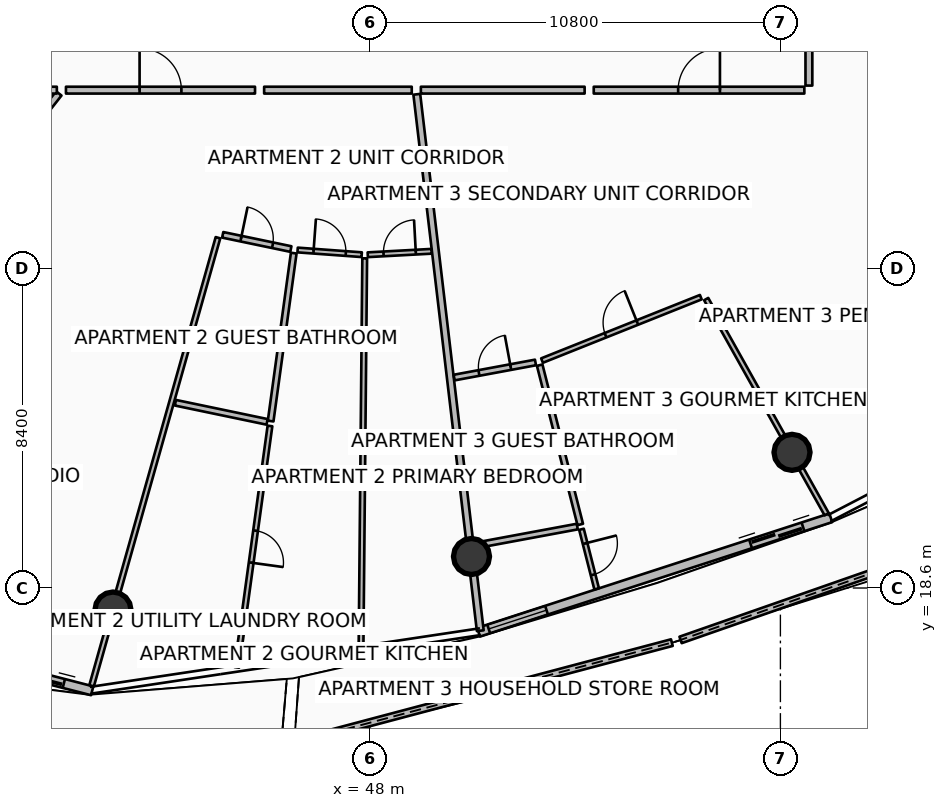
"""IFC4 building model, lengths in metres.
Left out: names, types, materials, properties, quantities, classifications, styles, units other than length and angle.
Written with IfcOpenShell. Run it as: python <this file> out.ifc"""

import sys

from ifc_helpers import new_model, si_unit, direction, frame, frame_2d, origin, origin_2d, place, context, subcontext, project, spatial, polyline, rectangle, circle, outline, extrude, element, fill, save


model = new_model("IFC4")
c1 = context("Model", 3, precision=1e-05, world=origin(), true_north=direction((0.0, 1.0)))
c2 = subcontext(c1, "Body", "Model", "MODEL_VIEW")
j1 = project(units=[si_unit("LENGTHUNIT", "METRE"), si_unit("PLANEANGLEUNIT", "RADIAN")], contexts=[c1])
p1 = place(None, origin())
s1 = spatial("IfcSite", under=j1, at=p1, CompositionType="ELEMENT")
p2 = place(p1, origin())
s2 = spatial("IfcBuilding", under=s1, at=p2, CompositionType="ELEMENT")
p3 = place(p2, frame((0.0, 0.0, 279.05)))
s3 = spatial("IfcBuildingStorey", under=s2, at=p3, CompositionType="ELEMENT", Elevation=279.05)
for number, where, z_axis, x_axis in (
    (1, (41.237, 18.021, 0.0), (0.0, 0.0, 1.0), (1.0, 0.0, 0.0)),
    (2, (50.671, 19.429, 0.0), (0.0, 0.0, 1.0), (1.0, 0.0, 0.0)),
    (3, (59.105, 22.17, 0.0), (0.0, 0.0, 1.0), (1.0, 0.0, 0.0)),
):
    element("IfcColumn", number, at=place(p3, frame(where, z_axis=z_axis, x_axis=x_axis)), inside=s3, PredefinedType="COLUMN", context=c2, shape_type="SweptSolid", body=[
        extrude(circle(Radius=0.475, at=origin_2d()), origin(), (0.0, 0.0, 1.0), 3.59),
    ])
p4 = place(p3, frame((46.007, 14.527, 0.0), z_axis=(0.0, 0.0, 1.0), x_axis=(0.96657188746, 0.256395761219, 0.0)))
e4 = element("IfcWall", 4, at=p4, inside=s3, PredefinedType="PARAPET", context=c2, shape_type="SweptSolid", body=[
    extrude(outline(polyline([(0.0, 0.0), (10.281, 0.0), (10.281, 1.148), (5.14, 1.127), (0.0, 1.224), (0.0, 0.0)])), frame((0.0, 0.09, 0.0), z_axis=(0.0, -1.0, 0.0), x_axis=(1.0, 0.0, 0.0)), (0.0, 0.0, 1.0), 0.18),
])
p5 = place(p3, frame((56.173, 17.234, 0.0), z_axis=(0.0, 0.0, 1.0), x_axis=(0.944003849273, 0.329934436757, 0.0)))
e5 = element("IfcWall", 5, at=p5, inside=s3, PredefinedType="PARAPET", context=c2, shape_type="SweptSolid", body=[
    extrude(outline(polyline([(0.0, 0.0), (10.406, 0.0), (10.406, 1.483), (5.203, 1.284), (0.0, 1.148), (0.0, 0.0)])), frame((0.0, 0.09, 0.0), z_axis=(0.0, -1.0, 0.0), x_axis=(1.0, 0.0, 0.0)), (0.0, 0.0, 1.0), 0.18),
])
p6 = place(p3, frame((29.614, 18.751, 0.0), z_axis=(0.0, 0.0, 1.0), x_axis=(0.968343758421, -0.249620442927, 0.0)))
e6 = element("IfcWall", 6, at=p6, inside=s3, PredefinedType="SOLIDWALL", context=c2, shape_type="SweptSolid", body=[
    extrude(rectangle(XDim=11.438, YDim=0.24, at=frame_2d((5.719, 0.0))), origin(), (0.0, 0.0, 1.0), 2.54),
])
p7 = place(p6, frame((9.218, 0.0, 0.0)))
e7 = element("IfcOpeningElement", 7, at=p7, cuts=e6, PredefinedType="OPENING", context=c2, shape_type="SweptSolid", body=[
    extrude(rectangle(XDim=1.45, YDim=2.15, at=frame_2d((0.725, 1.075))), frame((0.0, 0.13, 0.0), z_axis=(0.0, -1.0, 0.0), x_axis=(1.0, 0.0, 0.0)), (0.0, 0.0, 1.0), 0.26),
])
p8 = place(p6, frame((0.28, 0.0, 0.65)))
e8 = element("IfcOpeningElement", 8, at=p8, cuts=e6, PredefinedType="OPENING", context=c2, shape_type="SweptSolid", body=[
    extrude(rectangle(XDim=1.6, YDim=1.5, at=frame_2d((0.8, 0.75))), frame((0.0, 0.13, 0.0), z_axis=(0.0, -1.0, 0.0), x_axis=(1.0, 0.0, 0.0)), (0.0, 0.0, 1.0), 0.26),
])
p9 = place(p3, frame((50.858, 17.436, 0.0), z_axis=(0.0, 0.0, 1.0), x_axis=(0.951055974609, 0.309018661507, 0.0)))
e9 = element("IfcWall", 9, at=p9, inside=s3, PredefinedType="SOLIDWALL", context=c2, shape_type="SweptSolid", body=[
    extrude(rectangle(XDim=9.745, YDim=0.24, at=frame_2d((4.873, 0.0))), origin(), (0.0, 0.0, 1.0), 2.54),
])
p10 = place(p9, frame((7.525, 0.0, 0.0)))
e10 = element("IfcOpeningElement", 10, at=p10, cuts=e9, PredefinedType="OPENING", context=c2, shape_type="SweptSolid", body=[
    extrude(rectangle(XDim=1.45, YDim=2.15, at=frame_2d((0.725, 1.075))), frame((0.0, 0.13, 0.0), z_axis=(0.0, -1.0, 0.0), x_axis=(1.0, 0.0, 0.0)), (0.0, 0.0, 1.0), 0.26),
])
p11 = place(p9, frame((0.28, 0.0, 0.65)))
e11 = element("IfcOpeningElement", 11, at=p11, cuts=e9, PredefinedType="OPENING", context=c2, shape_type="SweptSolid", body=[
    extrude(rectangle(XDim=1.6, YDim=1.5, at=frame_2d((0.8, 0.75))), frame((0.0, 0.13, 0.0), z_axis=(0.0, -1.0, 0.0), x_axis=(1.0, 0.0, 0.0)), (0.0, 0.0, 1.0), 0.26),
])
p12 = place(p3, frame((39.812, 31.614, 0.0), z_axis=(0.0, 0.0, 1.0), x_axis=(-0.619097230176, -0.785314344443, 0.0)))
e12 = element("IfcWall", 12, at=p12, inside=s3, PredefinedType="PARTITIONING", context=c2, shape_type="SweptSolid", body=[
    extrude(rectangle(XDim=16.37, YDim=0.18, at=frame_2d((8.185, 0.0))), origin(), (0.0, 0.0, 1.0), 2.957),
])
p13 = place(p3, frame((49.232, 31.591, 0.0), z_axis=(0.0, 0.0, 1.0), x_axis=(0.117545848714, -0.993067456646, 0.0)))
e13 = element("IfcWall", 13, at=p13, inside=s3, PredefinedType="PARTITIONING", context=c2, shape_type="SweptSolid", body=[
    extrude(rectangle(XDim=14.213, YDim=0.18, at=frame_2d((7.106, 0.0))), origin(), (0.0, 0.0, 1.0), 2.957),
])
p14 = place(p3, frame((37.42, 31.7, 0.0), z_axis=(0.0, 0.0, 1.0), x_axis=(1.0, 0.0, 0.0)))
e14 = element("IfcWall", 14, at=p14, inside=s3, PredefinedType="PARTITIONING", context=c2, shape_type="SweptSolid", body=[
    extrude(rectangle(XDim=2.34, YDim=0.18, at=frame_2d((1.17, 0.0))), origin(), (0.0, 0.0, 1.0), 2.957),
])
p15 = place(p3, frame((40.0, 31.7, 0.0), z_axis=(0.0, 0.0, 1.0), x_axis=(1.0, 0.0, 0.0)))
e15 = element("IfcWall", 15, at=p15, inside=s3, PredefinedType="PARTITIONING", context=c2, shape_type="SweptSolid", body=[
    extrude(rectangle(XDim=4.975, YDim=0.18, at=frame_2d((2.488, 0.0))), origin(), (0.0, 0.0, 1.0), 2.957),
])
p16 = place(p15, frame((1.938, 0.0, 0.0)))
e16 = element("IfcOpeningElement", 16, at=p16, cuts=e15, PredefinedType="OPENING", context=c2, shape_type="SweptSolid", body=[
    extrude(rectangle(XDim=1.1, YDim=2.1, at=frame_2d((0.55, 1.05))), frame((0.0, 0.1, 0.0), z_axis=(0.0, -1.0, 0.0), x_axis=(1.0, 0.0, 0.0)), (0.0, 0.0, 1.0), 0.2),
])
p17 = place(p3, frame((45.215, 31.7, 0.0), z_axis=(0.0, 0.0, 1.0), x_axis=(1.0, 0.0, 0.0)))
e17 = element("IfcWall", 17, at=p17, inside=s3, PredefinedType="PARTITIONING", context=c2, shape_type="SweptSolid", body=[
    extrude(rectangle(XDim=3.884, YDim=0.18, at=frame_2d((1.942, 0.0))), origin(), (0.0, 0.0, 1.0), 2.957),
])
p18 = place(p3, frame((44.0, 27.817, 0.0), z_axis=(0.0, 0.0, 1.0), x_axis=(-0.271434127064, -0.962457019646, 0.0)))
e18 = element("IfcWall", 18, at=p18, inside=s3, PredefinedType="PARTITIONING", context=c2, shape_type="SweptSolid", body=[
    extrude(rectangle(XDim=12.249, YDim=0.125, at=frame_2d((6.125, 0.0))), origin(), (0.0, 0.0, 1.0), 2.957),
])
p19 = place(p3, frame((44.125, 27.893, 0.0), z_axis=(0.0, 0.0, 1.0), x_axis=(0.978900502262, -0.204337482294, 0.0)))
e19 = element("IfcWall", 19, at=p19, inside=s3, PredefinedType="PARTITIONING", context=c2, shape_type="SweptSolid", body=[
    extrude(rectangle(XDim=1.832, YDim=0.15, at=frame_2d((0.916, 0.0))), origin(), (0.0, 0.0, 1.0), 2.957),
])
p20 = place(p19, frame((0.491, 0.0, 0.0)))
e20 = element("IfcOpeningElement", 20, at=p20, cuts=e19, PredefinedType="OPENING", context=c2, shape_type="SweptSolid", body=[
    extrude(rectangle(XDim=0.85, YDim=2.06, at=frame_2d((0.425, 1.03))), frame((0.0, 0.085, 0.0), z_axis=(0.0, -1.0, 0.0), x_axis=(1.0, 0.0, 0.0)), (0.0, 0.0, 1.0), 0.17),
])
p21 = place(p3, frame((42.879, 23.475, 0.0), z_axis=(0.0, 0.0, 1.0), x_axis=(0.978912814884, -0.204278488479, 0.0)))
e21 = element("IfcWall", 21, at=p21, inside=s3, PredefinedType="PARTITIONING", context=c2, shape_type="SweptSolid", body=[
    extrude(rectangle(XDim=2.466, YDim=0.15, at=frame_2d((1.233, 0.0))), origin(), (0.0, 0.0, 1.0), 2.957),
])
p22 = place(p3, frame((45.994, 27.411, 0.0), z_axis=(0.0, 0.0, 1.0), x_axis=(-0.136246545396, -0.99067496126, 0.0)))
e22 = element("IfcWall", 22, at=p22, inside=s3, PredefinedType="PARTITIONING", context=c2, shape_type="SweptSolid", body=[
    extrude(rectangle(XDim=4.46, YDim=0.15, at=frame_2d((2.23, 0.0))), origin(), (0.0, 0.0, 1.0), 3.03),
])
p23 = place(p3, frame((45.368, 22.864, 0.0), z_axis=(0.0, 0.0, 1.0), x_axis=(-0.136200589596, -0.99068128043, 0.0)))
e23 = element("IfcWall", 23, at=p23, inside=s3, PredefinedType="PARTITIONING", context=c2, shape_type="SweptSolid", body=[
    extrude(rectangle(XDim=6.412, YDim=0.125, at=frame_2d((3.206, 0.0))), origin(), (0.0, 0.0, 1.0), 3.03),
])
p24 = place(p23, frame((2.781, 0.0, 0.0)))
e24 = element("IfcOpeningElement", 24, at=p24, cuts=e23, PredefinedType="OPENING", context=c2, shape_type="SweptSolid", body=[
    extrude(rectangle(XDim=0.85, YDim=2.06, at=frame_2d((0.425, 1.03))), frame((0.0, 0.073, 0.0), z_axis=(0.0, -1.0, 0.0), x_axis=(1.0, 0.0, 0.0)), (0.0, 0.0, 1.0), 0.145),
])
p25 = place(p3, frame((47.861, 27.275, 0.0), z_axis=(0.0, 0.0, 1.0), x_axis=(-0.009436905939, -0.999955471412, 0.0)))
e25 = element("IfcWall", 25, at=p25, inside=s3, PredefinedType="PARTITIONING", context=c2, shape_type="SweptSolid", body=[
    extrude(rectangle(XDim=10.271, YDim=0.125, at=frame_2d((5.135, 0.0))), origin(), (0.0, 0.0, 1.0), 3.03),
])
p26 = place(p3, frame((46.096, 27.494, 0.0), z_axis=(0.0, 0.0, 1.0), x_axis=(0.997337823183, -0.072919588925, 0.0)))
e26 = element("IfcWall", 26, at=p26, inside=s3, PredefinedType="PARTITIONING", context=c2, shape_type="SweptSolid", body=[
    extrude(rectangle(XDim=1.691, YDim=0.125, at=frame_2d((0.845, 0.0))), origin(), (0.0, 0.0, 1.0), 3.03),
])
p27 = place(p26, frame((0.42, 0.0, 0.0)))
e27 = element("IfcOpeningElement", 27, at=p27, cuts=e26, PredefinedType="OPENING", context=c2, shape_type="SweptSolid", body=[
    extrude(rectangle(XDim=0.85, YDim=2.06, at=frame_2d((0.425, 1.03))), frame((0.0, 0.073, 0.0), z_axis=(0.0, -1.0, 0.0), x_axis=(1.0, 0.0, 0.0)), (0.0, 0.0, 1.0), 0.145),
])
p28 = place(p3, frame((47.942, 27.369, 0.0), z_axis=(0.0, 0.0, 1.0), x_axis=(0.998523596101, 0.054319683628, 0.0)))
e28 = element("IfcWall", 28, at=p28, inside=s3, PredefinedType="PARTITIONING", context=c2, shape_type="SweptSolid", body=[
    extrude(rectangle(XDim=1.681, YDim=0.125, at=frame_2d((0.84, 0.0))), origin(), (0.0, 0.0, 1.0), 3.03),
])
p29 = place(p28, frame((0.415, 0.0, 0.0)))
e29 = element("IfcOpeningElement", 29, at=p29, cuts=e28, PredefinedType="OPENING", context=c2, shape_type="SweptSolid", body=[
    extrude(rectangle(XDim=0.85, YDim=2.06, at=frame_2d((0.425, 1.03))), frame((0.0, 0.073, 0.0), z_axis=(0.0, -1.0, 0.0), x_axis=(1.0, 0.0, 0.0)), (0.0, 0.0, 1.0), 0.145),
])
p30 = place(p3, frame((53.888, 31.7, 0.0), z_axis=(0.0, 0.0, 1.0), x_axis=(1.0, 0.0, 0.0)))
e30 = element("IfcWall", 30, at=p30, inside=s3, PredefinedType="PARTITIONING", context=c2, shape_type="SweptSolid", body=[
    extrude(rectangle(XDim=5.542, YDim=0.18, at=frame_2d((2.771, 0.0))), origin(), (0.0, 0.0, 1.0), 2.957),
])
p31 = place(p30, frame((2.221, 0.0, 0.0)))
e31 = element("IfcOpeningElement", 31, at=p31, cuts=e30, PredefinedType="OPENING", context=c2, shape_type="SweptSolid", body=[
    extrude(rectangle(XDim=1.1, YDim=2.1, at=frame_2d((0.55, 1.05))), frame((0.0, 0.1, 0.0), z_axis=(0.0, -1.0, 0.0), x_axis=(1.0, 0.0, 0.0)), (0.0, 0.0, 1.0), 0.2),
])
p32 = place(p3, frame((59.55, 31.82, 0.0), z_axis=(0.0, 0.0, 1.0), x_axis=(0.0, 1.0, 0.0)))
e32 = element("IfcWall", 32, at=p32, inside=s3, PredefinedType="PARTITIONING", context=c2, shape_type="SweptSolid", body=[
    extrude(rectangle(XDim=0.955, YDim=0.18, at=frame_2d((0.477, 0.0))), origin(), (0.0, 0.0, 1.0), 2.957),
])
p33 = place(p3, frame((49.339, 31.7, 0.0), z_axis=(0.0, 0.0, 1.0), x_axis=(1.0, 0.0, 0.0)))
e33 = element("IfcWall", 33, at=p33, inside=s3, PredefinedType="PARTITIONING", context=c2, shape_type="SweptSolid", body=[
    extrude(rectangle(XDim=4.309, YDim=0.18, at=frame_2d((2.155, 0.0))), origin(), (0.0, 0.0, 1.0), 2.957),
])
p34 = place(p3, frame((56.847, 26.203, 0.0), z_axis=(0.0, 0.0, 1.0), x_axis=(0.488636594114, -0.872487409017, 0.0)))
e34 = element("IfcWall", 34, at=p34, inside=s3, PredefinedType="PARTITIONING", context=c2, shape_type="SweptSolid", body=[
    extrude(rectangle(XDim=6.489, YDim=0.125, at=frame_2d((3.244, 0.0))), origin(), (0.0, 0.0, 1.0), 2.957),
])
p35 = place(p3, frame((50.215, 24.137, 0.0), z_axis=(0.0, 0.0, 1.0), x_axis=(0.983215758485, 0.182446628542, 0.0)))
e35 = element("IfcWall", 35, at=p35, inside=s3, PredefinedType="PARTITIONING", context=c2, shape_type="SweptSolid", body=[
    extrude(rectangle(XDim=2.177, YDim=0.15, at=frame_2d((1.089, 0.0))), origin(), (0.0, 0.0, 1.0), 2.957),
])
p36 = place(p35, frame((0.664, 0.0, 0.0)))
e36 = element("IfcOpeningElement", 36, at=p36, cuts=e35, PredefinedType="OPENING", context=c2, shape_type="SweptSolid", body=[
    extrude(rectangle(XDim=0.85, YDim=2.06, at=frame_2d((0.425, 1.03))), frame((0.0, 0.085, 0.0), z_axis=(0.0, -1.0, 0.0), x_axis=(1.0, 0.0, 0.0)), (0.0, 0.0, 1.0), 0.17),
])
p37 = place(p3, frame((50.738, 19.712, 0.0), z_axis=(0.0, 0.0, 1.0), x_axis=(0.983195760322, 0.18255436693, 0.0)))
e37 = element("IfcWall", 37, at=p37, inside=s3, PredefinedType="PARTITIONING", context=c2, shape_type="SweptSolid", body=[
    extrude(rectangle(XDim=2.763, YDim=0.15, at=frame_2d((1.381, 0.0))), origin(), (0.0, 0.0, 1.0), 2.957),
])
p38 = place(p3, frame((52.466, 24.464, 0.0), z_axis=(0.0, 0.0, 1.0), x_axis=(0.246795883472, -0.969067485731, 0.0)))
e38 = element("IfcWall", 38, at=p38, inside=s3, PredefinedType="PARTITIONING", context=c2, shape_type="SweptSolid", body=[
    extrude(rectangle(XDim=4.326, YDim=0.15, at=frame_2d((2.163, 0.0))), origin(), (0.0, 0.0, 1.0), 3.03),
])
p39 = place(p3, frame((53.565, 20.146, 0.0), z_axis=(0.0, 0.0, 1.0), x_axis=(0.24689818157, -0.969041427359, 0.0)))
e39 = element("IfcWall", 39, at=p39, inside=s3, PredefinedType="PARTITIONING", context=c2, shape_type="SweptSolid", body=[
    extrude(rectangle(XDim=1.619, YDim=0.125, at=frame_2d((0.809, 0.0))), origin(), (0.0, 0.0, 1.0), 3.03),
])
p40 = place(p39, frame((0.385, 0.0, 0.0)))
e40 = element("IfcOpeningElement", 40, at=p40, cuts=e39, PredefinedType="OPENING", context=c2, shape_type="SweptSolid", body=[
    extrude(rectangle(XDim=0.85, YDim=2.06, at=frame_2d((0.425, 1.03))), frame((0.0, 0.073, 0.0), z_axis=(0.0, -1.0, 0.0), x_axis=(1.0, 0.0, 0.0)), (0.0, 0.0, 1.0), 0.145),
])
p41 = place(p3, frame((52.527, 24.584, 0.0), z_axis=(0.0, 0.0, 1.0), x_axis=(0.928678664633, 0.370885343274, 0.0)))
e41 = element("IfcWall", 41, at=p41, inside=s3, PredefinedType="PARTITIONING", context=c2, shape_type="SweptSolid", body=[
    extrude(rectangle(XDim=4.499, YDim=0.125, at=frame_2d((2.249, 0.0))), origin(), (0.0, 0.0, 1.0), 2.957),
])
p42 = place(p41, frame((1.799, 0.0, 0.0)))
e42 = element("IfcOpeningElement", 42, at=p42, cuts=e41, PredefinedType="OPENING", context=c2, shape_type="SweptSolid", body=[
    extrude(rectangle(XDim=0.9, YDim=2.08, at=frame_2d((0.45, 1.04))), frame((0.0, 0.073, 0.0), z_axis=(0.0, -1.0, 0.0), x_axis=(1.0, 0.0, 0.0)), (0.0, 0.0, 1.0), 0.145),
])
p43 = place(p7, origin())
e43 = element("IfcDoor", 43, at=p43, inside=s3, OperationType="DOUBLE_DOOR_SLIDING", PredefinedType="DOOR", context=c2, shape_type="SweptSolid", body=[
    extrude(rectangle(XDim=1.45, YDim=2.15, at=frame_2d((0.725, 1.075))), frame((0.0, 0.025, 0.0), z_axis=(0.0, -1.0, 0.0), x_axis=(1.0, 0.0, 0.0)), (0.0, 0.0, 1.0), 0.05),
])
fill(e7, e43)
p44 = place(p10, origin())
e44 = element("IfcDoor", 44, at=p44, inside=s3, OperationType="DOUBLE_DOOR_SLIDING", PredefinedType="DOOR", context=c2, shape_type="SweptSolid", body=[
    extrude(rectangle(XDim=1.45, YDim=2.15, at=frame_2d((0.725, 1.075))), frame((0.0, 0.025, 0.0), z_axis=(0.0, -1.0, 0.0), x_axis=(1.0, 0.0, 0.0)), (0.0, 0.0, 1.0), 0.05),
])
fill(e10, e44)
p45 = place(p11, origin())
e45 = element("IfcWindow", 45, at=p45, inside=s3, PartitioningType="SINGLE_PANEL", PredefinedType="WINDOW", context=c2, shape_type="SweptSolid", body=[
    extrude(rectangle(XDim=1.6, YDim=1.5, at=frame_2d((0.8, 0.75))), frame((0.0, 0.03, 0.0), z_axis=(0.0, -1.0, 0.0), x_axis=(1.0, 0.0, 0.0)), (0.0, 0.0, 1.0), 0.06),
])
fill(e11, e45)
p46 = place(p16, origin())
e46 = element("IfcDoor", 46, at=p46, inside=s3, OperationType="SINGLE_SWING_LEFT", PredefinedType="DOOR", context=c2, shape_type="SweptSolid", body=[
    extrude(rectangle(XDim=1.1, YDim=2.1, at=frame_2d((0.55, 1.05))), frame((0.0, 0.025, 0.0), z_axis=(0.0, -1.0, 0.0), x_axis=(1.0, 0.0, 0.0)), (0.0, 0.0, 1.0), 0.05),
])
fill(e16, e46)
p47 = place(p20, origin())
e47 = element("IfcDoor", 47, at=p47, inside=s3, OperationType="SINGLE_SWING_LEFT", PredefinedType="DOOR", context=c2, shape_type="SweptSolid", body=[
    extrude(rectangle(XDim=0.85, YDim=2.06, at=frame_2d((0.425, 1.03))), frame((0.0, 0.025, 0.0), z_axis=(0.0, -1.0, 0.0), x_axis=(1.0, 0.0, 0.0)), (0.0, 0.0, 1.0), 0.05),
])
fill(e20, e47)
p48 = place(p24, origin())
e48 = element("IfcDoor", 48, at=p48, inside=s3, OperationType="SINGLE_SWING_RIGHT", PredefinedType="DOOR", context=c2, shape_type="SweptSolid", body=[
    extrude(rectangle(XDim=0.85, YDim=2.06, at=frame_2d((0.425, 1.03))), frame((0.0, 0.025, 0.0), z_axis=(0.0, -1.0, 0.0), x_axis=(1.0, 0.0, 0.0)), (0.0, 0.0, 1.0), 0.05),
])
fill(e24, e48)
p49 = place(p27, origin())
e49 = element("IfcDoor", 49, at=p49, inside=s3, OperationType="SINGLE_SWING_LEFT", PredefinedType="DOOR", context=c2, shape_type="SweptSolid", body=[
    extrude(rectangle(XDim=0.85, YDim=2.06, at=frame_2d((0.425, 1.03))), frame((0.0, 0.025, 0.0), z_axis=(0.0, -1.0, 0.0), x_axis=(1.0, 0.0, 0.0)), (0.0, 0.0, 1.0), 0.05),
])
fill(e27, e49)
p50 = place(p29, origin())
e50 = element("IfcDoor", 50, at=p50, inside=s3, OperationType="SINGLE_SWING_RIGHT", PredefinedType="DOOR", context=c2, shape_type="SweptSolid", body=[
    extrude(rectangle(XDim=0.85, YDim=2.06, at=frame_2d((0.425, 1.03))), frame((0.0, 0.025, 0.0), z_axis=(0.0, -1.0, 0.0), x_axis=(1.0, 0.0, 0.0)), (0.0, 0.0, 1.0), 0.05),
])
fill(e29, e50)
p51 = place(p31, origin())
e51 = element("IfcDoor", 51, at=p51, inside=s3, OperationType="SINGLE_SWING_RIGHT", PredefinedType="DOOR", context=c2, shape_type="SweptSolid", body=[
    extrude(rectangle(XDim=1.1, YDim=2.1, at=frame_2d((0.55, 1.05))), frame((0.0, 0.025, 0.0), z_axis=(0.0, -1.0, 0.0), x_axis=(1.0, 0.0, 0.0)), (0.0, 0.0, 1.0), 0.05),
])
fill(e31, e51)
p52 = place(p36, origin())
e52 = element("IfcDoor", 52, at=p52, inside=s3, OperationType="SINGLE_SWING_RIGHT", PredefinedType="DOOR", context=c2, shape_type="SweptSolid", body=[
    extrude(rectangle(XDim=0.85, YDim=2.06, at=frame_2d((0.425, 1.03))), frame((0.0, 0.025, 0.0), z_axis=(0.0, -1.0, 0.0), x_axis=(1.0, 0.0, 0.0)), (0.0, 0.0, 1.0), 0.05),
])
fill(e36, e52)
p53 = place(p40, origin())
e53 = element("IfcDoor", 53, at=p53, inside=s3, OperationType="SINGLE_SWING_LEFT", PredefinedType="DOOR", context=c2, shape_type="SweptSolid", body=[
    extrude(rectangle(XDim=0.85, YDim=2.06, at=frame_2d((0.425, 1.03))), frame((0.0, 0.025, 0.0), z_axis=(0.0, -1.0, 0.0), x_axis=(1.0, 0.0, 0.0)), (0.0, 0.0, 1.0), 0.05),
])
fill(e40, e53)
p54 = place(p42, origin())
e54 = element("IfcDoor", 54, at=p54, inside=s3, OperationType="SINGLE_SWING_RIGHT", PredefinedType="DOOR", context=c2, shape_type="SweptSolid", body=[
    extrude(rectangle(XDim=0.9, YDim=2.08, at=frame_2d((0.45, 1.04))), frame((0.0, 0.025, 0.0), z_axis=(0.0, -1.0, 0.0), x_axis=(1.0, 0.0, 0.0)), (0.0, 0.0, 1.0), 0.05),
])
fill(e42, e54)
save(model, sys.argv[1])
